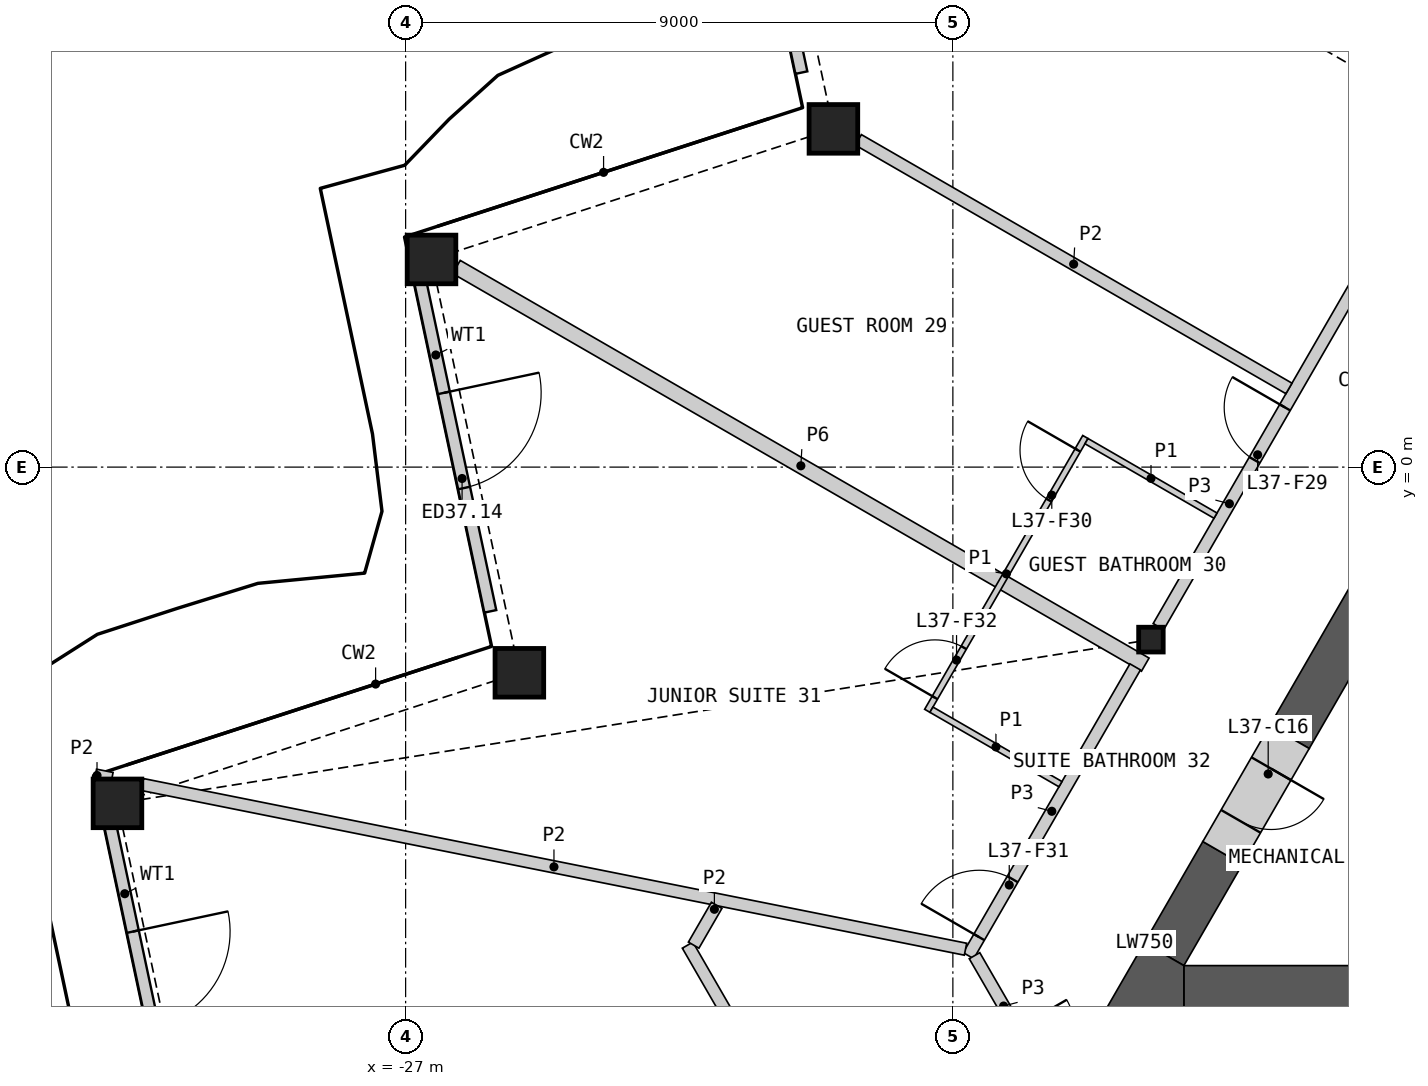
"""IFC4 building model, lengths in metres.
Left out: names, types, materials, properties, quantities, classifications, styles, units other than length and angle.
Written with IfcOpenShell. Run it as: python <this file> out.ifc"""

import sys

from ifc_helpers import new_model, si_unit, direction, frame, frame_2d, origin, origin_2d, place, context, subcontext, project, spatial, polyline, rectangle, hollow_rectangle, i_section, outline, extrude, element, fill, save


model = new_model("IFC4")
c1 = context("Model", 3, precision=1e-05, world=origin(), true_north=direction((0.0, 1.0)))
c2 = subcontext(c1, "Body", "Model", "MODEL_VIEW")
j1 = project(units=[si_unit("LENGTHUNIT", "METRE"), si_unit("PLANEANGLEUNIT", "RADIAN")], contexts=[c1])
p1 = place(None, origin())
s1 = spatial("IfcSite", under=j1, at=p1, CompositionType="ELEMENT")
p2 = place(p1, origin())
s2 = spatial("IfcBuilding", under=s1, at=p2, CompositionType="ELEMENT")
p3 = place(p2, frame((0.0, 0.0, 176.4)))
s3 = spatial("IfcBuildingStorey", under=s2, at=p3, CompositionType="ELEMENT", Elevation=176.4)
for number, where, z_axis, x_axis in (
    (1, (-19.965, 5.563, 0.0), (0.0, 0.0, 1.0), (1.0, 0.0, 0.0)),
    (2, (-26.574, 3.415, 0.0), (0.0, 0.0, 1.0), (1.0, 0.0, 0.0)),
    (3, (-25.129, -3.383, 0.0), (0.0, 0.0, 1.0), (1.0, 0.0, 0.0)),
    (4, (-31.739, -5.53, 0.0), (0.0, 0.0, 1.0), (1.0, 0.0, 0.0)),
):
    element("IfcColumn", number, at=place(p3, frame(where, z_axis=z_axis, x_axis=x_axis)), inside=s3, PredefinedType="COLUMN", context=c2, shape_type="SweptSolid", body=[
        extrude(hollow_rectangle(XDim=0.8, YDim=0.8, WallThickness=0.05, at=origin_2d()), origin(), (0.0, 0.0, 1.0), 3.6),
    ])
p4 = place(p3, frame((-14.743, -2.837, 0.0), z_axis=(0.0, 0.0, 1.0), x_axis=(1.0, 0.0, 0.0)))
e5 = element("IfcColumn", 5, at=p4, inside=s3, PredefinedType="COLUMN", context=c2, shape_type="SweptSolid", body=[
    extrude(i_section(OverallWidth=0.404, OverallDepth=0.407, WebThickness=0.027, FlangeThickness=0.044, at=origin_2d()), origin(), (0.0, 0.0, 1.0), 3.6),
])
p5 = place(p3, frame((-21.686, 12.111, 0.0), z_axis=(0.0, 0.0, 1.0), x_axis=(0.207872471739, -0.978155936184, 0.0)))
e6 = element("IfcWall", 6, at=p5, inside=s3, PredefinedType="SOLIDWALL", context=c2, shape_type="SweptSolid", body=[
    extrude(rectangle(XDim=5.748, YDim=0.2, at=frame_2d((2.874, 0.0))), origin(), (0.0, 0.0, 1.0), 2.701),
])
p6 = place(p5, frame((2.074, 0.0, 0.0)))
e7 = element("IfcOpeningElement", 7, at=p6, cuts=e6, PredefinedType="OPENING", context=c2, shape_type="SweptSolid", body=[
    extrude(rectangle(XDim=1.6, YDim=2.4, at=frame_2d((0.8, 1.2))), frame((0.0, 0.11, 0.0), z_axis=(0.0, -1.0, 0.0), x_axis=(1.0, 0.0, 0.0)), (0.0, 0.0, 1.0), 0.22),
])
p7 = place(p3, frame((-26.802, 3.25, 0.0), z_axis=(0.0, 0.0, 1.0), x_axis=(0.207921749173, -0.97814546271, 0.0)))
e8 = element("IfcWall", 8, at=p7, inside=s3, PredefinedType="SOLIDWALL", context=c2, shape_type="SweptSolid", body=[
    extrude(rectangle(XDim=5.748, YDim=0.2, at=frame_2d((2.874, 0.0))), origin(), (0.0, 0.0, 1.0), 2.701),
])
p8 = place(p7, frame((2.074, 0.0, 0.0)))
e9 = element("IfcOpeningElement", 9, at=p8, cuts=e8, PredefinedType="OPENING", context=c2, shape_type="SweptSolid", body=[
    extrude(rectangle(XDim=1.6, YDim=2.4, at=frame_2d((0.8, 1.2))), frame((0.0, 0.11, 0.0), z_axis=(0.0, -1.0, 0.0), x_axis=(1.0, 0.0, 0.0)), (0.0, 0.0, 1.0), 0.22),
])
p9 = place(p3, frame((-31.918, -5.611, 0.0), z_axis=(0.0, 0.0, 1.0), x_axis=(0.207913110781, -0.97814729891, 0.0)))
e10 = element("IfcWall", 10, at=p9, inside=s3, PredefinedType="SOLIDWALL", context=c2, shape_type="SweptSolid", body=[
    extrude(rectangle(XDim=5.748, YDim=0.2, at=frame_2d((2.874, 0.0))), origin(), (0.0, 0.0, 1.0), 2.701),
])
p10 = place(p9, frame((2.074, 0.0, 0.0)))
e11 = element("IfcOpeningElement", 11, at=p10, cuts=e10, PredefinedType="OPENING", context=c2, shape_type="SweptSolid", body=[
    extrude(rectangle(XDim=1.6, YDim=2.4, at=frame_2d((0.8, 1.2))), frame((0.0, 0.11, 0.0), z_axis=(0.0, -1.0, 0.0), x_axis=(1.0, 0.0, 0.0)), (0.0, 0.0, 1.0), 0.22),
])
p11 = place(p3, frame((-14.201, -8.574, 0.0), z_axis=(0.0, 0.0, 1.0), x_axis=(1.0, 0.0, 0.0)))
e12 = element("IfcWall", 12, at=p11, inside=s3, PredefinedType="SHEAR", context=c2, shape_type="SweptSolid", body=[
    extrude(rectangle(XDim=6.785, YDim=0.75, at=frame_2d((3.393, 0.0))), origin(), (0.0, 0.0, 1.0), 3.25),
])
p12 = place(p3, frame((-11.133, -2.135, 0.0), z_axis=(0.0, 0.0, 1.0), x_axis=(-0.499936812382, -0.866061882099, 0.0)))
e13 = element("IfcWall", 13, at=p12, inside=s3, PredefinedType="SHEAR", context=c2, shape_type="SweptSolid", body=[
    extrude(rectangle(XDim=2.662, YDim=0.75, at=frame_2d((1.331, 0.0))), origin(), (0.0, 0.0, 1.0), 3.25),
])
p13 = place(p3, frame((-13.564, -6.346, 0.0), z_axis=(0.0, 0.0, 1.0), x_axis=(-0.499989888488, -0.86603124159, 0.0)))
e14 = element("IfcWall", 14, at=p13, inside=s3, PredefinedType="SHEAR", context=c2, shape_type="SweptSolid", body=[
    extrude(rectangle(XDim=1.923, YDim=0.75, at=frame_2d((0.961, 0.0))), origin(), (0.0, 0.0, 1.0), 3.25),
])
p14 = place(p3, origin())
e15 = element("IfcWall", 15, at=p14, inside=s3, PredefinedType="SHEAR", context=c2, shape_type="SweptSolid", body=[
    extrude(outline(polyline([(-14.851, -7.824), (-14.201, -8.199), (-14.201, -8.949), (-15.5, -8.949), (-14.851, -7.824)])), origin(), (0.0, 0.0, 1.0), 3.25),
])
p15 = place(p3, frame((-12.464, -4.441, 0.0), z_axis=(0.0, 0.0, 1.0), x_axis=(-0.499994660107, -0.866028486751, 0.0)))
e16 = element("IfcWall", 16, at=p15, inside=s3, PredefinedType="SHEAR", context=c2, shape_type="SweptSolid", body=[
    extrude(rectangle(XDim=2.2, YDim=0.75, at=frame_2d((1.1, 0.0))), origin(), (0.0, 0.0, 1.0), 3.25),
])
p16 = place(p15, frame((0.6, 0.0, 0.0)))
e17 = element("IfcOpeningElement", 17, at=p16, cuts=e16, PredefinedType="OPENING", context=c2, shape_type="SweptSolid", body=[
    extrude(rectangle(XDim=1.0, YDim=2.1, at=frame_2d((0.5, 1.05))), frame((0.0, 0.385, 0.0), z_axis=(0.0, -1.0, 0.0), x_axis=(1.0, 0.0, 0.0)), (0.0, 0.0, 1.0), 0.77),
])
p17 = place(p3, frame((-26.164, 3.292, 0.0), z_axis=(0.0, 0.0, 1.0), x_axis=(0.866022412254, -0.500005181446, 0.0)))
e18 = element("IfcWall", 18, at=p17, inside=s3, PredefinedType="PARTITIONING", context=c2, shape_type="SweptSolid", body=[
    extrude(rectangle(XDim=13.081, YDim=0.25, at=frame_2d((6.541, 0.0))), origin(), (0.0, 0.0, 1.0), 2.404),
])
p18 = place(p3, frame((-14.619, -2.624, 0.0), z_axis=(0.0, 0.0, 1.0), x_axis=(0.50000393355, 0.866023132736, 0.0)))
e19 = element("IfcWall", 19, at=p18, inside=s3, PredefinedType="PARTITIONING", context=c2, shape_type="SweptSolid", body=[
    extrude(rectangle(XDim=9.335, YDim=0.2, at=frame_2d((4.667, 0.0))), origin(), (0.0, 0.0, 1.0), 3.25),
])
p19 = place(p18, frame((3.163, 0.0, 0.0)))
e20 = element("IfcOpeningElement", 20, at=p19, cuts=e19, PredefinedType="OPENING", context=c2, shape_type="SweptSolid", body=[
    extrude(rectangle(XDim=1.0, YDim=2.1, at=frame_2d((0.5, 1.05))), frame((0.0, 0.11, 0.0), z_axis=(0.0, -1.0, 0.0), x_axis=(1.0, 0.0, 0.0)), (0.0, 0.0, 1.0), 0.22),
])
p20 = place(p3, frame((-17.744, -8.035, 0.0), z_axis=(0.0, 0.0, 1.0), x_axis=(0.500007607708, 0.866021011428, 0.0)))
e21 = element("IfcWall", 21, at=p20, inside=s3, PredefinedType="PARTITIONING", context=c2, shape_type="SweptSolid", body=[
    extrude(rectangle(XDim=5.484, YDim=0.2, at=frame_2d((2.742, 0.0))), origin(), (0.0, 0.0, 1.0), 3.25),
])
p21 = place(p20, frame((0.352, 0.0, 0.0)))
e22 = element("IfcOpeningElement", 22, at=p21, cuts=e21, PredefinedType="OPENING", context=c2, shape_type="SweptSolid", body=[
    extrude(rectangle(XDim=1.1, YDim=2.1, at=frame_2d((0.55, 1.05))), frame((0.0, 0.11, 0.0), z_axis=(0.0, -1.0, 0.0), x_axis=(1.0, 0.0, 0.0)), (0.0, 0.0, 1.0), 0.22),
])
p22 = place(p3, frame((-17.644, -8.035, 0.0), z_axis=(0.0, 0.0, 1.0), x_axis=(0.499961815444, -0.866047448526, 0.0)))
e23 = element("IfcWall", 23, at=p22, inside=s3, PredefinedType="PARTITIONING", context=c2, shape_type="SweptSolid", body=[
    extrude(rectangle(XDim=3.826, YDim=0.2, at=frame_2d((1.913, 0.0))), origin(), (0.0, 0.0, 1.0), 3.25),
])
p23 = place(p22, frame((1.386, 0.0, 0.0)))
e24 = element("IfcOpeningElement", 24, at=p23, cuts=e23, PredefinedType="OPENING", context=c2, shape_type="SweptSolid", body=[
    extrude(rectangle(XDim=0.95, YDim=2.1, at=frame_2d((0.475, 1.05))), frame((0.0, 0.11, 0.0), z_axis=(0.0, -1.0, 0.0), x_axis=(1.0, 0.0, 0.0)), (0.0, 0.0, 1.0), 0.22),
])
p24 = place(p3, frame((-31.329, -5.221, 0.0), z_axis=(0.0, 0.0, 1.0), x_axis=(0.980565709097, -0.196190953266, 0.0)))
e25 = element("IfcWall", 25, at=p24, inside=s3, PredefinedType="PARTITIONING", context=c2, shape_type="SweptSolid", body=[
    extrude(rectangle(XDim=13.805, YDim=0.2, at=frame_2d((6.903, 0.0))), origin(), (0.0, 0.0, 1.0), 2.404),
])
p25 = place(p3, frame((-22.363, -7.862, 0.0), z_axis=(0.0, 0.0, 1.0), x_axis=(0.500009728207, -0.866019787128, 0.0)))
e26 = element("IfcWall", 26, at=p25, inside=s3, PredefinedType="PARTITIONING", context=c2, shape_type="SweptSolid", body=[
    extrude(rectangle(XDim=11.967, YDim=0.2, at=frame_2d((5.983, 0.0))), origin(), (0.0, 0.0, 1.0), 2.404),
])
p26 = place(p25, frame((5.658, 0.0, 0.0)))
e27 = element("IfcOpeningElement", 27, at=p26, cuts=e26, PredefinedType="OPENING", context=c2, shape_type="SweptSolid", body=[
    extrude(rectangle(XDim=0.95, YDim=2.1, at=frame_2d((0.475, 1.05))), frame((0.0, 0.11, 0.0), z_axis=(0.0, -1.0, 0.0), x_axis=(1.0, 0.0, 0.0)), (0.0, 0.0, 1.0), 0.22),
])
p27 = place(p3, frame((-19.555, 5.383, 0.0), z_axis=(0.0, 0.0, 1.0), x_axis=(0.866027979776, -0.499995538225, 0.0)))
e28 = element("IfcWall", 28, at=p27, inside=s3, PredefinedType="PARTITIONING", context=c2, shape_type="SweptSolid", body=[
    extrude(rectangle(XDim=8.177, YDim=0.2, at=frame_2d((4.089, 0.0))), origin(), (0.0, 0.0, 1.0), 2.404),
])
p28 = place(p3, frame((-22.263, -7.862, 0.0), z_axis=(0.0, 0.0, 1.0), x_axis=(0.499852814723, 0.866110364569, 0.0)))
e29 = element("IfcWall", 29, at=p28, inside=s3, PredefinedType="PARTITIONING", context=c2, shape_type="SweptSolid", body=[
    extrude(rectangle(XDim=0.757, YDim=0.2, at=frame_2d((0.378, 0.0))), origin(), (0.0, 0.0, 1.0), 2.404),
])
p29 = place(p3, frame((-32.103, -5.066, 0.0), z_axis=(0.0, 0.0, 1.0), x_axis=(0.980512850695, -0.19645495571, 0.0)))
e30 = element("IfcWall", 30, at=p29, inside=s3, PredefinedType="PARTITIONING", context=c2, shape_type="SweptSolid", body=[
    extrude(rectangle(XDim=0.277, YDim=0.2, at=frame_2d((0.139, 0.0))), origin(), (0.0, 0.0, 1.0), 2.404),
])
p30 = place(p3, frame((-18.421, -4.008, 0.0), z_axis=(0.0, 0.0, 1.0), x_axis=(0.500006934395, 0.866021400173, 0.0)))
e31 = element("IfcWall", 31, at=p30, inside=s3, PredefinedType="PARTITIONING", context=c2, shape_type="SweptSolid", body=[
    extrude(rectangle(XDim=5.2, YDim=0.1, at=frame_2d((2.6, 0.0))), origin(), (0.0, 0.0, 1.0), 2.404),
])
p31 = place(p30, frame((4.0, 0.0, 0.0)))
e32 = element("IfcOpeningElement", 32, at=p31, cuts=e31, PredefinedType="OPENING", context=c2, shape_type="SweptSolid", body=[
    extrude(rectangle(XDim=0.95, YDim=2.1, at=frame_2d((0.475, 1.05))), frame((0.0, 0.06, 0.0), z_axis=(0.0, -1.0, 0.0), x_axis=(1.0, 0.0, 0.0)), (0.0, 0.0, 1.0), 0.12),
])
p32 = place(p30, frame((0.25, 0.0, 0.0)))
e33 = element("IfcOpeningElement", 33, at=p32, cuts=e31, PredefinedType="OPENING", context=c2, shape_type="SweptSolid", body=[
    extrude(rectangle(XDim=0.95, YDim=2.1, at=frame_2d((0.475, 1.05))), frame((0.0, 0.06, 0.0), z_axis=(0.0, -1.0, 0.0), x_axis=(1.0, 0.0, 0.0)), (0.0, 0.0, 1.0), 0.12),
])
p33 = place(p3, frame((-18.353, -3.99, 0.0), z_axis=(0.0, 0.0, 1.0), x_axis=(0.866057815567, -0.499943856944, 0.0)))
e34 = element("IfcWall", 34, at=p33, inside=s3, PredefinedType="PARTITIONING", context=c2, shape_type="SweptSolid", body=[
    extrude(rectangle(XDim=2.45, YDim=0.1, at=frame_2d((1.225, 0.0))), origin(), (0.0, 0.0, 1.0), 2.404),
])
p34 = place(p3, frame((-15.802, 0.427, 0.0), z_axis=(0.0, 0.0, 1.0), x_axis=(0.866032905446, -0.499987006516, 0.0)))
e35 = element("IfcWall", 35, at=p34, inside=s3, PredefinedType="PARTITIONING", context=c2, shape_type="SweptSolid", body=[
    extrude(rectangle(XDim=2.45, YDim=0.1, at=frame_2d((1.225, 0.0))), origin(), (0.0, 0.0, 1.0), 2.404),
])
p35 = place(p8, origin())
e36 = element("IfcDoor", 36, at=p35, inside=s3, OperationType="DOUBLE_DOOR_SINGLE_SWING", PredefinedType="DOOR", context=c2, shape_type="SweptSolid", body=[
    extrude(rectangle(XDim=1.6, YDim=2.4, at=frame_2d((0.8, 1.2))), frame((0.0, 0.025, 0.0), z_axis=(0.0, -1.0, 0.0), x_axis=(1.0, 0.0, 0.0)), (0.0, 0.0, 1.0), 0.05),
])
fill(e9, e36)
p36 = place(p10, origin())
e37 = element("IfcDoor", 37, at=p36, inside=s3, OperationType="DOUBLE_DOOR_SINGLE_SWING", PredefinedType="DOOR", context=c2, shape_type="SweptSolid", body=[
    extrude(rectangle(XDim=1.6, YDim=2.4, at=frame_2d((0.8, 1.2))), frame((0.0, 0.025, 0.0), z_axis=(0.0, -1.0, 0.0), x_axis=(1.0, 0.0, 0.0)), (0.0, 0.0, 1.0), 0.05),
])
fill(e11, e37)
p37 = place(p16, origin())
e38 = element("IfcDoor", 38, at=p37, inside=s3, OperationType="SINGLE_SWING_LEFT", PredefinedType="DOOR", context=c2, shape_type="SweptSolid", body=[
    extrude(rectangle(XDim=1.0, YDim=2.1, at=frame_2d((0.5, 1.05))), frame((0.0, 0.13, 0.0), z_axis=(0.0, -1.0, 0.0), x_axis=(1.0, 0.0, 0.0)), (0.0, 0.0, 1.0), 0.05),
])
fill(e17, e38)
p38 = place(p19, origin())
e39 = element("IfcDoor", 39, at=p38, inside=s3, OperationType="SINGLE_SWING_RIGHT", PredefinedType="DOOR", context=c2, shape_type="SweptSolid", body=[
    extrude(rectangle(XDim=1.0, YDim=2.1, at=frame_2d((0.5, 1.05))), frame((0.0, 0.025, 0.0), z_axis=(0.0, -1.0, 0.0), x_axis=(1.0, 0.0, 0.0)), (0.0, 0.0, 1.0), 0.05),
])
fill(e20, e39)
p39 = place(p31, origin())
e40 = element("IfcDoor", 40, at=p39, inside=s3, OperationType="SINGLE_SWING_RIGHT", PredefinedType="DOOR", context=c2, shape_type="SweptSolid", body=[
    extrude(rectangle(XDim=0.95, YDim=2.1, at=frame_2d((0.475, 1.05))), frame((0.0, 0.025, 0.0), z_axis=(0.0, -1.0, 0.0), x_axis=(1.0, 0.0, 0.0)), (0.0, 0.0, 1.0), 0.05),
])
fill(e32, e40)
p40 = place(p21, origin())
e41 = element("IfcDoor", 41, at=p40, inside=s3, OperationType="SINGLE_SWING_LEFT", PredefinedType="DOOR", context=c2, shape_type="SweptSolid", body=[
    extrude(rectangle(XDim=1.1, YDim=2.1, at=frame_2d((0.55, 1.05))), frame((0.0, 0.025, 0.0), z_axis=(0.0, -1.0, 0.0), x_axis=(1.0, 0.0, 0.0)), (0.0, 0.0, 1.0), 0.05),
])
fill(e22, e41)
p41 = place(p32, origin())
e42 = element("IfcDoor", 42, at=p41, inside=s3, OperationType="SINGLE_SWING_LEFT", PredefinedType="DOOR", context=c2, shape_type="SweptSolid", body=[
    extrude(rectangle(XDim=0.95, YDim=2.1, at=frame_2d((0.475, 1.05))), frame((0.0, 0.025, 0.0), z_axis=(0.0, -1.0, 0.0), x_axis=(1.0, 0.0, 0.0)), (0.0, 0.0, 1.0), 0.05),
])
fill(e33, e42)
save(model, sys.argv[1])
